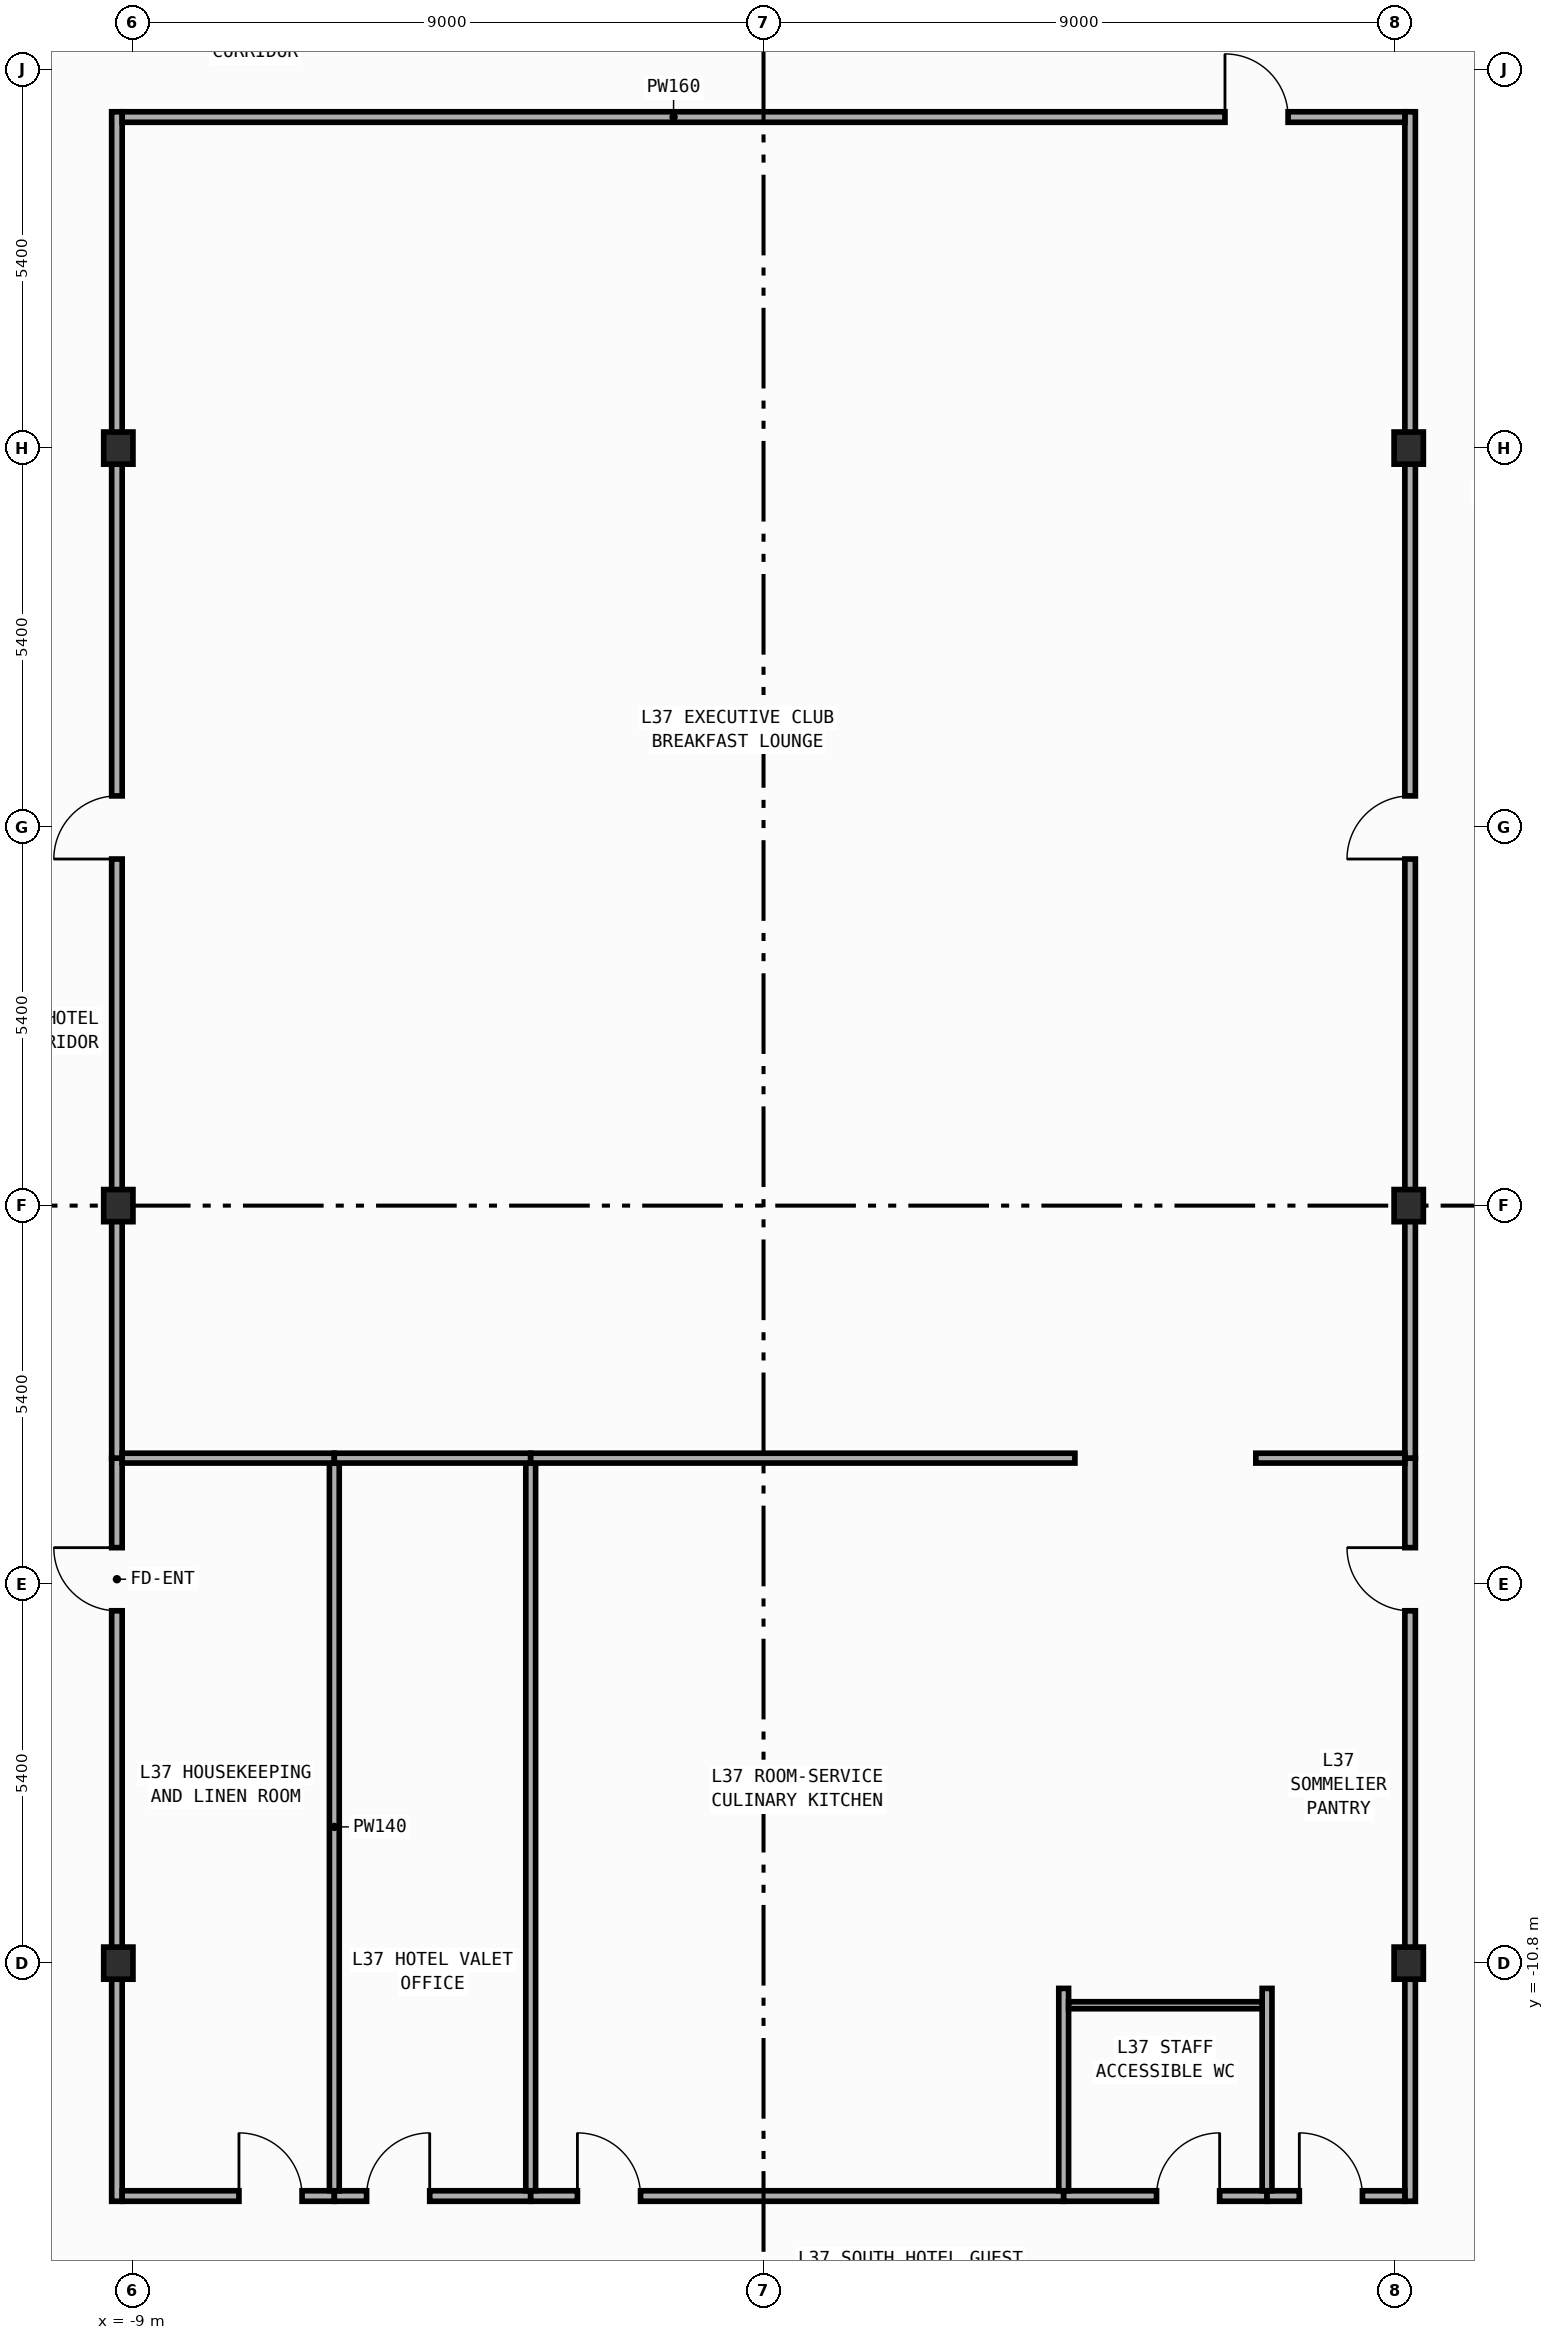
"""IFC4 building model, lengths in metres.
Left out: names, types, materials, properties, quantities, classifications, styles, units other than length and angle.
Written with IfcOpenShell. Run it as: python <this file> out.ifc"""

import sys

from ifc_helpers import new_model, si_unit, direction, frame, frame_2d, origin, origin_2d, place, context, subcontext, project, spatial, rectangle, i_section, extrude, element, fill, save


model = new_model("IFC4")
c1 = context("Model", 3, precision=1e-05, world=origin(), true_north=direction((0.0, 1.0)))
c2 = subcontext(c1, "Body", "Model", "MODEL_VIEW")
j1 = project(units=[si_unit("LENGTHUNIT", "METRE"), si_unit("PLANEANGLEUNIT", "RADIAN")], contexts=[c1])
p1 = place(None, origin())
s1 = spatial("IfcSite", under=j1, at=p1, CompositionType="ELEMENT")
p2 = place(p1, origin())
s2 = spatial("IfcBuilding", under=s1, at=p2, CompositionType="ELEMENT")
p3 = place(p2, frame((0.0, 0.0, 165.0)))
s3 = spatial("IfcBuildingStorey", under=s2, at=p3, CompositionType="ELEMENT", Elevation=165.0)
for number, where, z_axis, x_axis in (
    (1, (-9.2, -10.8, 0.0), (0.0, 0.0, 1.0), (1.0, 0.0, 0.0)),
    (2, (-9.2, 0.0, 0.0), (0.0, 0.0, 1.0), (1.0, 0.0, 0.0)),
    (3, (-9.2, 10.8, 0.0), (0.0, 0.0, 1.0), (1.0, 0.0, 0.0)),
    (4, (9.2, -10.8, 0.0), (0.0, 0.0, 1.0), (1.0, 0.0, 0.0)),
    (5, (9.2, 0.0, 0.0), (0.0, 0.0, 1.0), (1.0, 0.0, 0.0)),
    (6, (9.2, 10.8, 0.0), (0.0, 0.0, 1.0), (1.0, 0.0, 0.0)),
):
    element("IfcColumn", number, at=place(p3, frame(where, z_axis=z_axis, x_axis=x_axis)), inside=s3, PredefinedType="COLUMN", context=c2, shape_type="SweptSolid", body=[
        extrude(i_section(OverallWidth=0.417, OverallDepth=0.458, WebThickness=0.03, FlangeThickness=0.05, FilletRadius=0.022, at=origin_2d()), origin(), (0.0, 0.0, 1.0), 3.8),
    ])
p4 = place(p3, frame((-9.22, -14.195, 0.0), z_axis=(0.0, 0.0, 1.0), x_axis=(0.0, 1.0, 0.0)))
e7 = element("IfcWall", 7, at=p4, inside=s3, PredefinedType="PARTITIONING", context=c2, shape_type="SweptSolid", body=[
    extrude(rectangle(XDim=10.595, YDim=0.15, at=frame_2d((5.297, 0.0))), origin(), (0.0, 0.0, 1.0), 2.952),
])
p5 = place(p4, frame((8.419, 0.0, 0.0)))
e8 = element("IfcOpeningElement", 8, at=p5, cuts=e7, PredefinedType="OPENING", context=c2, shape_type="SweptSolid", body=[
    extrude(rectangle(XDim=0.9, YDim=2.15, at=frame_2d((0.45, 1.075))), frame((0.0, 0.085, 0.0), z_axis=(0.0, -1.0, 0.0), x_axis=(1.0, 0.0, 0.0)), (0.0, 0.0, 1.0), 0.17),
])
p6 = place(p3, frame((-9.22, -3.6, 0.0), z_axis=(0.0, 0.0, 1.0), x_axis=(0.0, 1.0, 0.0)))
e9 = element("IfcWall", 9, at=p6, inside=s3, PredefinedType="PARTITIONING", context=c2, shape_type="SweptSolid", body=[
    extrude(rectangle(XDim=19.195, YDim=0.15, at=frame_2d((9.598, 0.0))), origin(), (0.0, 0.0, 1.0), 2.952),
])
p7 = place(p6, frame((8.542, 0.0, 0.0)))
e10 = element("IfcOpeningElement", 10, at=p7, cuts=e9, PredefinedType="OPENING", context=c2, shape_type="SweptSolid", body=[
    extrude(rectangle(XDim=0.9, YDim=2.15, at=frame_2d((0.45, 1.075))), frame((0.0, 0.085, 0.0), z_axis=(0.0, -1.0, 0.0), x_axis=(1.0, 0.0, 0.0)), (0.0, 0.0, 1.0), 0.17),
])
p8 = place(p3, frame((9.22, -14.195, 0.0), z_axis=(0.0, 0.0, 1.0), x_axis=(0.0, 1.0, 0.0)))
e11 = element("IfcWall", 11, at=p8, inside=s3, PredefinedType="PARTITIONING", context=c2, shape_type="SweptSolid", body=[
    extrude(rectangle(XDim=10.595, YDim=0.15, at=frame_2d((5.297, 0.0))), origin(), (0.0, 0.0, 1.0), 2.952),
])
p9 = place(p8, frame((8.419, 0.0, 0.0)))
e12 = element("IfcOpeningElement", 12, at=p9, cuts=e11, PredefinedType="OPENING", context=c2, shape_type="SweptSolid", body=[
    extrude(rectangle(XDim=0.9, YDim=2.15, at=frame_2d((0.45, 1.075))), frame((0.0, 0.085, 0.0), z_axis=(0.0, -1.0, 0.0), x_axis=(1.0, 0.0, 0.0)), (0.0, 0.0, 1.0), 0.17),
])
p10 = place(p3, frame((9.22, -3.6, 0.0), z_axis=(0.0, 0.0, 1.0), x_axis=(0.0, 1.0, 0.0)))
e13 = element("IfcWall", 13, at=p10, inside=s3, PredefinedType="PARTITIONING", context=c2, shape_type="SweptSolid", body=[
    extrude(rectangle(XDim=19.195, YDim=0.15, at=frame_2d((9.598, 0.0))), origin(), (0.0, 0.0, 1.0), 2.952),
])
p11 = place(p10, frame((8.542, 0.0, 0.0)))
e14 = element("IfcOpeningElement", 14, at=p11, cuts=e13, PredefinedType="OPENING", context=c2, shape_type="SweptSolid", body=[
    extrude(rectangle(XDim=0.9, YDim=2.15, at=frame_2d((0.45, 1.075))), frame((0.0, 0.085, 0.0), z_axis=(0.0, -1.0, 0.0), x_axis=(1.0, 0.0, 0.0)), (0.0, 0.0, 1.0), 0.17),
])
p12 = place(p3, frame((-9.145, 15.52, 0.0), z_axis=(0.0, 0.0, 1.0), x_axis=(1.0, 0.0, 0.0)))
e15 = element("IfcWall", 15, at=p12, inside=s3, PredefinedType="PARTITIONING", context=c2, shape_type="SweptSolid", body=[
    extrude(rectangle(XDim=18.29, YDim=0.15, at=frame_2d((9.145, 0.0))), origin(), (0.0, 0.0, 1.0), 3.54),
])
p13 = place(p12, frame((15.725, 0.0, 0.0)))
e16 = element("IfcOpeningElement", 16, at=p13, cuts=e15, PredefinedType="OPENING", context=c2, shape_type="SweptSolid", body=[
    extrude(rectangle(XDim=0.9, YDim=2.15, at=frame_2d((0.45, 1.075))), frame((0.0, 0.085, 0.0), z_axis=(0.0, -1.0, 0.0), x_axis=(1.0, 0.0, 0.0)), (0.0, 0.0, 1.0), 0.17),
])
p14 = place(p3, frame((-9.145, -14.12, 0.0), z_axis=(0.0, 0.0, 1.0), x_axis=(1.0, 0.0, 0.0)))
e17 = element("IfcWall", 17, at=p14, inside=s3, PredefinedType="PARTITIONING", context=c2, shape_type="SweptSolid", body=[
    extrude(rectangle(XDim=3.025, YDim=0.15, at=frame_2d((1.512, 0.0))), origin(), (0.0, 0.0, 1.0), 3.54),
])
p15 = place(p14, frame((1.665, 0.0, 0.0)))
e18 = element("IfcOpeningElement", 18, at=p15, cuts=e17, PredefinedType="OPENING", context=c2, shape_type="SweptSolid", body=[
    extrude(rectangle(XDim=0.9, YDim=2.15, at=frame_2d((0.45, 1.075))), frame((0.0, 0.085, 0.0), z_axis=(0.0, -1.0, 0.0), x_axis=(1.0, 0.0, 0.0)), (0.0, 0.0, 1.0), 0.17),
])
p16 = place(p3, frame((-6.12, -14.12, 0.0), z_axis=(0.0, 0.0, 1.0), x_axis=(1.0, 0.0, 0.0)))
e19 = element("IfcWall", 19, at=p16, inside=s3, PredefinedType="PARTITIONING", context=c2, shape_type="SweptSolid", body=[
    extrude(rectangle(XDim=2.8, YDim=0.15, at=frame_2d((1.4, 0.0))), origin(), (0.0, 0.0, 1.0), 3.54),
])
p17 = place(p16, frame((0.46, 0.0, 0.0)))
e20 = element("IfcOpeningElement", 20, at=p17, cuts=e19, PredefinedType="OPENING", context=c2, shape_type="SweptSolid", body=[
    extrude(rectangle(XDim=0.9, YDim=2.15, at=frame_2d((0.45, 1.075))), frame((0.0, 0.085, 0.0), z_axis=(0.0, -1.0, 0.0), x_axis=(1.0, 0.0, 0.0)), (0.0, 0.0, 1.0), 0.17),
])
p18 = place(p3, frame((-3.32, -14.12, 0.0), z_axis=(0.0, 0.0, 1.0), x_axis=(1.0, 0.0, 0.0)))
e21 = element("IfcWall", 21, at=p18, inside=s3, PredefinedType="PARTITIONING", context=c2, shape_type="SweptSolid", body=[
    extrude(rectangle(XDim=7.6, YDim=0.15, at=frame_2d((3.8, 0.0))), origin(), (0.0, 0.0, 1.0), 3.54),
])
p19 = place(p18, frame((0.667, 0.0, 0.0)))
e22 = element("IfcOpeningElement", 22, at=p19, cuts=e21, PredefinedType="OPENING", context=c2, shape_type="SweptSolid", body=[
    extrude(rectangle(XDim=0.9, YDim=2.15, at=frame_2d((0.45, 1.075))), frame((0.0, 0.085, 0.0), z_axis=(0.0, -1.0, 0.0), x_axis=(1.0, 0.0, 0.0)), (0.0, 0.0, 1.0), 0.17),
])
p20 = place(p3, frame((4.28, -14.12, 0.0), z_axis=(0.0, 0.0, 1.0), x_axis=(1.0, 0.0, 0.0)))
e23 = element("IfcWall", 23, at=p20, inside=s3, PredefinedType="PARTITIONING", context=c2, shape_type="SweptSolid", body=[
    extrude(rectangle(XDim=2.9, YDim=0.15, at=frame_2d((1.45, 0.0))), origin(), (0.0, 0.0, 1.0), 3.54),
])
p21 = place(p20, frame((1.324, 0.0, 0.0)))
e24 = element("IfcOpeningElement", 24, at=p21, cuts=e23, PredefinedType="OPENING", context=c2, shape_type="SweptSolid", body=[
    extrude(rectangle(XDim=0.9, YDim=2.15, at=frame_2d((0.45, 1.075))), frame((0.0, 0.085, 0.0), z_axis=(0.0, -1.0, 0.0), x_axis=(1.0, 0.0, 0.0)), (0.0, 0.0, 1.0), 0.17),
])
p22 = place(p3, frame((7.18, -14.12, 0.0), z_axis=(0.0, 0.0, 1.0), x_axis=(1.0, 0.0, 0.0)))
e25 = element("IfcWall", 25, at=p22, inside=s3, PredefinedType="PARTITIONING", context=c2, shape_type="SweptSolid", body=[
    extrude(rectangle(XDim=1.965, YDim=0.15, at=frame_2d((0.982, 0.0))), origin(), (0.0, 0.0, 1.0), 3.54),
])
p23 = place(p22, frame((0.46, 0.0, 0.0)))
e26 = element("IfcOpeningElement", 26, at=p23, cuts=e25, PredefinedType="OPENING", context=c2, shape_type="SweptSolid", body=[
    extrude(rectangle(XDim=0.9, YDim=2.15, at=frame_2d((0.45, 1.075))), frame((0.0, 0.085, 0.0), z_axis=(0.0, -1.0, 0.0), x_axis=(1.0, 0.0, 0.0)), (0.0, 0.0, 1.0), 0.17),
])
p24 = place(p3, frame((-6.12, -14.045, 0.0), z_axis=(0.0, 0.0, 1.0), x_axis=(0.0, 1.0, 0.0)))
e27 = element("IfcWall", 27, at=p24, inside=s3, PredefinedType="PARTITIONING", context=c2, shape_type="SweptSolid", body=[
    extrude(rectangle(XDim=10.375, YDim=0.14, at=frame_2d((5.188, 0.0))), origin(), (0.0, 0.0, 1.0), 3.54),
])
p25 = place(p3, frame((-9.145, -3.6, 0.0), z_axis=(0.0, 0.0, 1.0), x_axis=(1.0, 0.0, 0.0)))
e28 = element("IfcWall", 28, at=p25, inside=s3, PredefinedType="PARTITIONING", context=c2, shape_type="SweptSolid", body=[
    extrude(rectangle(XDim=3.025, YDim=0.14, at=frame_2d((1.512, 0.0))), origin(), (0.0, 0.0, 1.0), 3.54),
])
p26 = place(p3, frame((-3.32, -14.045, 0.0), z_axis=(0.0, 0.0, 1.0), x_axis=(0.0, 1.0, 0.0)))
e29 = element("IfcWall", 29, at=p26, inside=s3, PredefinedType="PARTITIONING", context=c2, shape_type="SweptSolid", body=[
    extrude(rectangle(XDim=10.375, YDim=0.14, at=frame_2d((5.188, 0.0))), origin(), (0.0, 0.0, 1.0), 3.54),
])
p27 = place(p3, frame((-6.12, -3.6, 0.0), z_axis=(0.0, 0.0, 1.0), x_axis=(1.0, 0.0, 0.0)))
e30 = element("IfcWall", 30, at=p27, inside=s3, PredefinedType="PARTITIONING", context=c2, shape_type="SweptSolid", body=[
    extrude(rectangle(XDim=2.8, YDim=0.14, at=frame_2d((1.4, 0.0))), origin(), (0.0, 0.0, 1.0), 3.54),
])
p28 = place(p3, frame((4.28, -14.045, 0.0), z_axis=(0.0, 0.0, 1.0), x_axis=(0.0, 1.0, 0.0)))
e31 = element("IfcWall", 31, at=p28, inside=s3, PredefinedType="PARTITIONING", context=c2, shape_type="SweptSolid", body=[
    extrude(rectangle(XDim=2.885, YDim=0.14, at=frame_2d((1.442, 0.0))), origin(), (0.0, 0.0, 1.0), 3.54),
])
p29 = place(p3, frame((-3.32, -3.6, 0.0), z_axis=(0.0, 0.0, 1.0), x_axis=(1.0, 0.0, 0.0)))
e32 = element("IfcWall", 32, at=p29, inside=s3, PredefinedType="PARTITIONING", context=c2, shape_type="SweptSolid", body=[
    extrude(rectangle(XDim=7.76, YDim=0.14, at=frame_2d((3.88, 0.0))), origin(), (0.0, 0.0, 1.0), 3.54),
])
p30 = place(p3, frame((7.18, -14.045, 0.0), z_axis=(0.0, 0.0, 1.0), x_axis=(0.0, 1.0, 0.0)))
e33 = element("IfcWall", 33, at=p30, inside=s3, PredefinedType="PARTITIONING", context=c2, shape_type="SweptSolid", body=[
    extrude(rectangle(XDim=2.885, YDim=0.14, at=frame_2d((1.442, 0.0))), origin(), (0.0, 0.0, 1.0), 3.54),
])
p31 = place(p3, frame((7.02, -3.6, 0.0), z_axis=(0.0, 0.0, 1.0), x_axis=(1.0, 0.0, 0.0)))
e34 = element("IfcWall", 34, at=p31, inside=s3, PredefinedType="PARTITIONING", context=c2, shape_type="SweptSolid", body=[
    extrude(rectangle(XDim=2.125, YDim=0.14, at=frame_2d((1.062, 0.0))), origin(), (0.0, 0.0, 1.0), 3.54),
])
p32 = place(p3, frame((4.35, -11.4, 0.0), z_axis=(0.0, 0.0, 1.0), x_axis=(1.0, 0.0, 0.0)))
e35 = element("IfcWall", 35, at=p32, inside=s3, PredefinedType="PARTITIONING", context=c2, shape_type="SweptSolid", body=[
    extrude(rectangle(XDim=2.76, YDim=0.1, at=frame_2d((1.38, 0.0))), origin(), (0.0, 0.0, 1.0), 3.54),
])
p33 = place(p5, origin())
e36 = element("IfcDoor", 36, at=p33, inside=s3, OperationType="SINGLE_SWING_RIGHT", PredefinedType="DOOR", context=c2, shape_type="SweptSolid", body=[
    extrude(rectangle(XDim=0.9, YDim=2.15, at=frame_2d((0.45, 1.075))), frame((0.0, 0.025, 0.0), z_axis=(0.0, -1.0, 0.0), x_axis=(1.0, 0.0, 0.0)), (0.0, 0.0, 1.0), 0.05),
])
fill(e8, e36)
p34 = place(p7, origin())
e37 = element("IfcDoor", 37, at=p34, inside=s3, OperationType="SINGLE_SWING_LEFT", PredefinedType="DOOR", context=c2, shape_type="SweptSolid", body=[
    extrude(rectangle(XDim=0.9, YDim=2.15, at=frame_2d((0.45, 1.075))), frame((0.0, 0.025, 0.0), z_axis=(0.0, -1.0, 0.0), x_axis=(1.0, 0.0, 0.0)), (0.0, 0.0, 1.0), 0.05),
])
fill(e10, e37)
p35 = place(p9, origin())
e38 = element("IfcDoor", 38, at=p35, inside=s3, OperationType="SINGLE_SWING_RIGHT", PredefinedType="DOOR", context=c2, shape_type="SweptSolid", body=[
    extrude(rectangle(XDim=0.9, YDim=2.15, at=frame_2d((0.45, 1.075))), frame((0.0, 0.025, 0.0), z_axis=(0.0, -1.0, 0.0), x_axis=(1.0, 0.0, 0.0)), (0.0, 0.0, 1.0), 0.05),
])
fill(e12, e38)
p36 = place(p11, origin())
e39 = element("IfcDoor", 39, at=p36, inside=s3, OperationType="SINGLE_SWING_LEFT", PredefinedType="DOOR", context=c2, shape_type="SweptSolid", body=[
    extrude(rectangle(XDim=0.9, YDim=2.15, at=frame_2d((0.45, 1.075))), frame((0.0, 0.025, 0.0), z_axis=(0.0, -1.0, 0.0), x_axis=(1.0, 0.0, 0.0)), (0.0, 0.0, 1.0), 0.05),
])
fill(e14, e39)
p37 = place(p13, origin())
e40 = element("IfcDoor", 40, at=p37, inside=s3, OperationType="SINGLE_SWING_LEFT", PredefinedType="DOOR", context=c2, shape_type="SweptSolid", body=[
    extrude(rectangle(XDim=0.9, YDim=2.15, at=frame_2d((0.45, 1.075))), frame((0.0, 0.025, 0.0), z_axis=(0.0, -1.0, 0.0), x_axis=(1.0, 0.0, 0.0)), (0.0, 0.0, 1.0), 0.05),
])
fill(e16, e40)
p38 = place(p15, origin())
e41 = element("IfcDoor", 41, at=p38, inside=s3, OperationType="SINGLE_SWING_LEFT", PredefinedType="DOOR", context=c2, shape_type="SweptSolid", body=[
    extrude(rectangle(XDim=0.9, YDim=2.15, at=frame_2d((0.45, 1.075))), frame((0.0, 0.025, 0.0), z_axis=(0.0, -1.0, 0.0), x_axis=(1.0, 0.0, 0.0)), (0.0, 0.0, 1.0), 0.05),
])
fill(e18, e41)
p39 = place(p17, origin())
e42 = element("IfcDoor", 42, at=p39, inside=s3, OperationType="SINGLE_SWING_RIGHT", PredefinedType="DOOR", context=c2, shape_type="SweptSolid", body=[
    extrude(rectangle(XDim=0.9, YDim=2.15, at=frame_2d((0.45, 1.075))), frame((0.0, 0.025, 0.0), z_axis=(0.0, -1.0, 0.0), x_axis=(1.0, 0.0, 0.0)), (0.0, 0.0, 1.0), 0.05),
])
fill(e20, e42)
p40 = place(p19, origin())
e43 = element("IfcDoor", 43, at=p40, inside=s3, OperationType="SINGLE_SWING_LEFT", PredefinedType="DOOR", context=c2, shape_type="SweptSolid", body=[
    extrude(rectangle(XDim=0.9, YDim=2.15, at=frame_2d((0.45, 1.075))), frame((0.0, 0.025, 0.0), z_axis=(0.0, -1.0, 0.0), x_axis=(1.0, 0.0, 0.0)), (0.0, 0.0, 1.0), 0.05),
])
fill(e22, e43)
p41 = place(p21, origin())
e44 = element("IfcDoor", 44, at=p41, inside=s3, OperationType="SINGLE_SWING_RIGHT", PredefinedType="DOOR", context=c2, shape_type="SweptSolid", body=[
    extrude(rectangle(XDim=0.9, YDim=2.15, at=frame_2d((0.45, 1.075))), frame((0.0, 0.025, 0.0), z_axis=(0.0, -1.0, 0.0), x_axis=(1.0, 0.0, 0.0)), (0.0, 0.0, 1.0), 0.05),
])
fill(e24, e44)
p42 = place(p23, origin())
e45 = element("IfcDoor", 45, at=p42, inside=s3, OperationType="SINGLE_SWING_LEFT", PredefinedType="DOOR", context=c2, shape_type="SweptSolid", body=[
    extrude(rectangle(XDim=0.9, YDim=2.15, at=frame_2d((0.45, 1.075))), frame((0.0, 0.025, 0.0), z_axis=(0.0, -1.0, 0.0), x_axis=(1.0, 0.0, 0.0)), (0.0, 0.0, 1.0), 0.05),
])
fill(e26, e45)
save(model, sys.argv[1])
